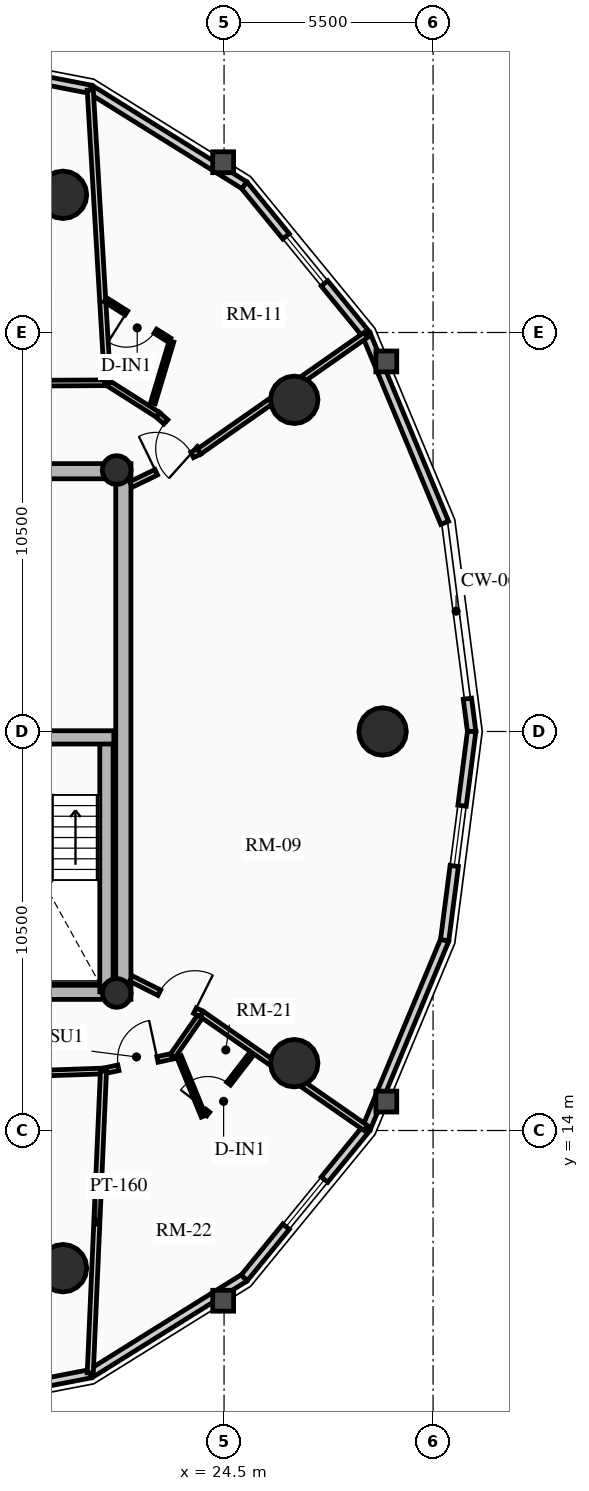
"""IFC4 building model, lengths in metres.
Left out: names, types, materials, properties, quantities, classifications, styles, units other than length and angle.
Written with IfcOpenShell. Run it as: python <this file> out.ifc"""

import sys

from ifc_helpers import new_model, si_unit, direction, frame, frame_2d, origin, origin_2d, place, context, subcontext, project, spatial, rectangle, circle, hollow_circle, extrude, source, transform, mapped, element, fill, save


model = new_model("IFC4")
c1 = context("Model", 3, precision=1e-05, world=origin(), true_north=direction((0.0, 1.0)))
c2 = subcontext(c1, "Body", "Model", "MODEL_VIEW")
j1 = project(units=[si_unit("LENGTHUNIT", "METRE"), si_unit("PLANEANGLEUNIT", "RADIAN")], contexts=[c1])
p1 = place(None, origin())
s1 = spatial("IfcSite", under=j1, at=p1, CompositionType="ELEMENT")
p2 = place(p1, origin())
s2 = spatial("IfcBuilding", under=s1, at=p2, CompositionType="ELEMENT")
p3 = place(p2, frame((0.0, 0.0, 157.42)))
s3 = spatial("IfcBuildingStorey", under=s2, at=p3, CompositionType="ELEMENT", Elevation=157.42)
p4 = place(p3, frame((21.85, 17.45, 0.0), z_axis=(0.0, 0.0, 1.0), x_axis=(0.0, 1.0, 0.0)))
e1 = element("IfcWall", 1, at=p4, inside=s3, PredefinedType="SHEAR", context=c2, shape_type="SweptSolid", body=[
    extrude(rectangle(XDim=14.1, YDim=0.4, at=frame_2d((7.05, 0.0))), origin(), (0.0, 0.0, 1.0), 2.91),
])
p5 = place(p3, frame((11.15, 17.65, 0.0), z_axis=(0.0, 0.0, 1.0), x_axis=(1.0, 0.0, 0.0)))
e2 = element("IfcWall", 2, at=p5, inside=s3, PredefinedType="SHEAR", context=c2, shape_type="SweptSolid", body=[
    extrude(rectangle(XDim=10.7, YDim=0.4, at=frame_2d((5.35, 0.0))), origin(), (0.0, 0.0, 1.0), 2.91),
])
m1 = source(origin(), c2, "Body", "SweptSolid", [
    extrude(rectangle(XDim=1.5, YDim=2.02, at=frame_2d((0.75, 1.01))), frame((0.0, 0.21, 0.0), z_axis=(0.0, -1.0, 0.0), x_axis=(1.0, 0.0, 0.0)), (0.0, 0.0, 1.0), 0.42),
])
p6 = place(p5, frame((5.45, 0.0, 0.0)))
e3 = element("IfcOpeningElement", 3, at=p6, cuts=e2, PredefinedType="OPENING", context=c2, shape_type="MappedRepresentation", body=[
    mapped(m1, transform((0.0, 0.0, 0.0), x_axis=(1.0, 0.0, 0.0), y_axis=(0.0, 1.0, 0.0), z_axis=(0.0, 0.0, 1.0), scale=1.0)),
])
p7 = place(p3, frame((11.15, 31.35, 0.0), z_axis=(0.0, 0.0, 1.0), x_axis=(1.0, 0.0, 0.0)))
e4 = element("IfcWall", 4, at=p7, inside=s3, PredefinedType="SHEAR", context=c2, shape_type="SweptSolid", body=[
    extrude(rectangle(XDim=10.7, YDim=0.4, at=frame_2d((5.35, 0.0))), origin(), (0.0, 0.0, 1.0), 2.91),
])
p8 = place(p7, frame((4.6, 0.0, 0.0)))
e5 = element("IfcOpeningElement", 5, at=p8, cuts=e4, PredefinedType="OPENING", context=c2, shape_type="MappedRepresentation", body=[
    mapped(m1, transform((0.0, 0.0, 0.0), x_axis=(1.0, 0.0, 0.0), y_axis=(0.0, 1.0, 0.0), z_axis=(0.0, 0.0, 1.0), scale=1.0)),
])
p9 = place(p3, frame((21.405, 17.65, 0.0), z_axis=(0.0, 0.0, 1.0), x_axis=(0.0, 1.0, 0.0)))
e6 = element("IfcWall", 6, at=p9, inside=s3, PredefinedType="SHEAR", context=c2, shape_type="SweptSolid", body=[
    extrude(rectangle(XDim=6.695, YDim=0.35, at=frame_2d((3.348, 0.0))), origin(), (0.0, 0.0, 1.0), 2.91),
])
p10 = place(p3, frame((18.315, 24.345, 0.0), z_axis=(0.0, 0.0, 1.0), x_axis=(1.0, 0.0, 0.0)))
e7 = element("IfcWall", 7, at=p10, inside=s3, PredefinedType="SHEAR", context=c2, shape_type="SweptSolid", body=[
    extrude(rectangle(XDim=3.285, YDim=0.35, at=frame_2d((1.643, 0.0))), origin(), (0.0, 0.0, 1.0), 2.91),
])
for number, where, z_axis, x_axis in (
    (8, (21.675, 17.62, 0.0), (0.0, 0.0, 1.0), (1.0, 0.0, 0.0)),
    (9, (21.675, 31.38, 0.0), (0.0, 0.0, 1.0), (1.0, 0.0, 0.0)),
):
    element("IfcColumn", number, at=place(p3, frame(where, z_axis=z_axis, x_axis=x_axis)), inside=s3, PredefinedType="COLUMN", context=c2, shape_type="SweptSolid", body=[
        extrude(hollow_circle(Radius=0.38, WallThickness=0.032, at=origin_2d()), origin(), (0.0, 0.0, 1.0), 2.91),
    ])
for number, where, z_axis, x_axis in (
    (10, (28.672, 24.5, 0.0), (0.0, 0.0, 1.0), (1.0, 0.0, 0.0)),
    (11, (26.347, 33.229, 0.0), (0.0, 0.0, 1.0), (1.0, 0.0, 0.0)),
    (12, (20.261, 38.623, 0.0), (0.0, 0.0, 1.0), (1.0, 0.0, 0.0)),
    (13, (20.261, 10.377, 0.0), (0.0, 0.0, 1.0), (1.0, 0.0, 0.0)),
    (14, (26.347, 15.771, 0.0), (0.0, 0.0, 1.0), (1.0, 0.0, 0.0)),
):
    element("IfcColumn", number, at=place(p3, frame(where, z_axis=z_axis, x_axis=x_axis)), inside=s3, PredefinedType="USERDEFINED", context=c2, shape_type="SweptSolid", body=[
        extrude(circle(Radius=0.625, at=origin_2d()), origin(), (0.0, 0.0, 1.0), 2.91),
    ])
p11 = place(p3, frame((30.903, 25.363, 0.0), z_axis=(0.0, 0.0, 1.0), x_axis=(0.128247365719, -0.991742211054, 0.0)))
e15 = element("IfcWall", 15, at=p11, inside=s3, PredefinedType="SOLIDWALL", context=c2, shape_type="SweptSolid", body=[
    extrude(rectangle(XDim=0.87, YDim=0.22, at=frame_2d((0.435, 0.0))), origin(), (0.0, 0.0, 1.0), 2.675),
])
p12 = place(p3, frame((28.243, 34.945, 0.0), z_axis=(0.0, 0.0, 1.0), x_axis=(0.384259959969, -0.923224936386, 0.0)))
e16 = element("IfcWall", 16, at=p12, inside=s3, PredefinedType="SOLIDWALL", context=c2, shape_type="SweptSolid", body=[
    extrude(rectangle(XDim=5.365, YDim=0.22, at=frame_2d((2.683, 0.0))), origin(), (0.0, 0.0, 1.0), 2.245),
])
p13 = place(p3, frame((25.032, 38.876, 0.0), z_axis=(0.0, 0.0, 1.0), x_axis=(0.632598524901, -0.774479894053, 0.0)))
e17 = element("IfcWall", 17, at=p13, inside=s3, PredefinedType="SOLIDWALL", context=c2, shape_type="SweptSolid", body=[
    extrude(rectangle(XDim=5.076, YDim=0.22, at=frame_2d((2.538, 0.0))), origin(), (0.0, 0.0, 1.0), 2.245),
])
m2 = source(origin(), c2, "Body", "SweptSolid", [
    extrude(rectangle(XDim=1.6, YDim=1.3, at=frame_2d((0.8, 0.65))), frame((0.0, 0.12, 0.0), z_axis=(0.0, -1.0, 0.0), x_axis=(1.0, 0.0, 0.0)), (0.0, 0.0, 1.0), 0.24),
])
p14 = place(p13, frame((1.738, 0.0, 0.65)))
e18 = element("IfcOpeningElement", 18, at=p14, cuts=e17, PredefinedType="OPENING", context=c2, shape_type="MappedRepresentation", body=[
    mapped(m2, transform((0.0, 0.0, 0.0), x_axis=(1.0, 0.0, 0.0), y_axis=(0.0, 1.0, 0.0), z_axis=(0.0, 0.0, 1.0), scale=1.0)),
])
p15 = place(p3, frame((20.985, 41.4, 0.0), z_axis=(0.0, 0.0, 1.0), x_axis=(0.848452391194, -0.529271707044, 0.0)))
e19 = element("IfcWall", 19, at=p15, inside=s3, PredefinedType="SOLIDWALL", context=c2, shape_type="SweptSolid", body=[
    extrude(rectangle(XDim=4.769, YDim=0.22, at=frame_2d((2.385, 0.0))), origin(), (0.0, 0.0, 1.0), 2.245),
])
p16 = place(p3, frame((16.5, 42.27, 0.0), z_axis=(0.0, 0.0, 1.0), x_axis=(0.981718699963, -0.190337579429, 0.0)))
e20 = element("IfcWall", 20, at=p16, inside=s3, PredefinedType="SOLIDWALL", context=c2, shape_type="SweptSolid", body=[
    extrude(rectangle(XDim=4.569, YDim=0.22, at=frame_2d((2.284, 0.0))), origin(), (0.0, 0.0, 1.0), 2.245),
])
p17 = place(p16, frame((1.484, 0.0, 0.65)))
e21 = element("IfcOpeningElement", 21, at=p17, cuts=e20, PredefinedType="OPENING", context=c2, shape_type="MappedRepresentation", body=[
    mapped(m2, transform((0.0, 0.0, 0.0), x_axis=(1.0, 0.0, 0.0), y_axis=(0.0, 1.0, 0.0), z_axis=(0.0, 0.0, 1.0), scale=1.0)),
])
p18 = place(p3, frame((20.985, 7.6, 0.0), z_axis=(0.0, 0.0, 1.0), x_axis=(-0.981718699963, -0.190337579429, 0.0)))
e22 = element("IfcWall", 22, at=p18, inside=s3, PredefinedType="SOLIDWALL", context=c2, shape_type="SweptSolid", body=[
    extrude(rectangle(XDim=4.569, YDim=0.22, at=frame_2d((2.284, 0.0))), origin(), (0.0, 0.0, 1.0), 2.245),
])
p19 = place(p18, frame((1.484, 0.0, 0.65)))
e23 = element("IfcOpeningElement", 23, at=p19, cuts=e22, PredefinedType="OPENING", context=c2, shape_type="MappedRepresentation", body=[
    mapped(m2, transform((0.0, 0.0, 0.0), x_axis=(1.0, 0.0, 0.0), y_axis=(0.0, 1.0, 0.0), z_axis=(0.0, 0.0, 1.0), scale=1.0)),
])
p20 = place(p3, frame((25.032, 10.124, 0.0), z_axis=(0.0, 0.0, 1.0), x_axis=(-0.848452391194, -0.529271707044, 0.0)))
e24 = element("IfcWall", 24, at=p20, inside=s3, PredefinedType="SOLIDWALL", context=c2, shape_type="SweptSolid", body=[
    extrude(rectangle(XDim=4.769, YDim=0.22, at=frame_2d((2.385, 0.0))), origin(), (0.0, 0.0, 1.0), 2.245),
])
p21 = place(p3, frame((28.243, 14.055, 0.0), z_axis=(0.0, 0.0, 1.0), x_axis=(-0.632598524901, -0.774479894053, 0.0)))
e25 = element("IfcWall", 25, at=p21, inside=s3, PredefinedType="SOLIDWALL", context=c2, shape_type="SweptSolid", body=[
    extrude(rectangle(XDim=5.076, YDim=0.22, at=frame_2d((2.538, 0.0))), origin(), (0.0, 0.0, 1.0), 2.245),
])
p22 = place(p21, frame((1.738, 0.0, 0.65)))
e26 = element("IfcOpeningElement", 26, at=p22, cuts=e25, PredefinedType="OPENING", context=c2, shape_type="MappedRepresentation", body=[
    mapped(m2, transform((0.0, 0.0, 0.0), x_axis=(1.0, 0.0, 0.0), y_axis=(0.0, 1.0, 0.0), z_axis=(0.0, 0.0, 1.0), scale=1.0)),
])
p23 = place(p3, frame((30.305, 19.009, 0.0), z_axis=(0.0, 0.0, 1.0), x_axis=(-0.384259959969, -0.923224936386, 0.0)))
e27 = element("IfcWall", 27, at=p23, inside=s3, PredefinedType="SOLIDWALL", context=c2, shape_type="SweptSolid", body=[
    extrude(rectangle(XDim=5.365, YDim=0.22, at=frame_2d((2.683, 0.0))), origin(), (0.0, 0.0, 1.0), 2.245),
])
p24 = place(p3, frame((31.015, 24.5, 0.0), z_axis=(0.0, 0.0, 1.0), x_axis=(-0.128266533912, -0.991739732126, 0.0)))
e28 = element("IfcWall", 28, at=p24, inside=s3, PredefinedType="SOLIDWALL", context=c2, shape_type="SweptSolid", body=[
    extrude(rectangle(XDim=5.537, YDim=0.22, at=frame_2d((2.769, 0.0))), origin(), (0.0, 0.0, 1.0), 2.245),
])
p25 = place(p24, frame((1.968, 0.0, 0.65)))
e29 = element("IfcOpeningElement", 29, at=p25, cuts=e28, PredefinedType="OPENING", context=c2, shape_type="MappedRepresentation", body=[
    mapped(m2, transform((0.0, 0.0, 0.0), x_axis=(1.0, 0.0, 0.0), y_axis=(0.0, 1.0, 0.0), z_axis=(0.0, 0.0, 1.0), scale=1.0)),
])
p26 = place(p3, frame((23.841, 31.866, 0.0), z_axis=(0.0, 0.0, 1.0), x_axis=(-0.74511843306, 0.666932171, 0.0)))
e30 = element("IfcWall", 30, at=p26, inside=s3, PredefinedType="PARTITIONING", context=c2, shape_type="SweptSolid", body=[
    extrude(rectangle(XDim=1.455, YDim=0.15, at=frame_2d((0.728, 0.0))), origin(), (0.0, 0.0, 1.0), 2.245),
])
m3 = source(origin(), c2, "Body", "SweptSolid", [
    extrude(rectangle(XDim=1.05, YDim=2.015, at=frame_2d((0.525, 1.007))), frame((0.0, 0.085, 0.0), z_axis=(0.0, -1.0, 0.0), x_axis=(1.0, 0.0, 0.0)), (0.0, 0.0, 1.0), 0.17),
])
p27 = place(p26, frame((0.12, 0.0, 0.0)))
e31 = element("IfcOpeningElement", 31, at=p27, cuts=e30, PredefinedType="OPENING", context=c2, shape_type="MappedRepresentation", body=[
    mapped(m3, transform((0.0, 0.0, 0.0), x_axis=(1.0, 0.0, 0.0), y_axis=(0.0, 1.0, 0.0), z_axis=(0.0, 0.0, 1.0), scale=1.0)),
])
p28 = place(p3, frame((22.756, 32.836, 0.0), z_axis=(0.0, 0.0, 1.0), x_axis=(-0.843828401801, 0.536613108593, 0.0)))
e32 = element("IfcWall", 32, at=p28, inside=s3, PredefinedType="PARTITIONING", context=c2, shape_type="SweptSolid", body=[
    extrude(rectangle(XDim=1.565, YDim=0.15, at=frame_2d((0.783, 0.0))), origin(), (0.0, 0.0, 1.0), 2.245),
])
p29 = place(p3, frame((21.435, 33.677, 0.0), z_axis=(0.0, 0.0, 1.0), x_axis=(-0.999986775557, -0.005142831114, 0.0)))
e33 = element("IfcWall", 33, at=p29, inside=s3, PredefinedType="PARTITIONING", context=c2, shape_type="SweptSolid", body=[
    extrude(rectangle(XDim=3.323, YDim=0.15, at=frame_2d((1.662, 0.0))), origin(), (0.0, 0.0, 1.0), 2.245),
])
p30 = place(p29, frame((1.645, 0.0, 0.0)))
e34 = element("IfcOpeningElement", 34, at=p30, cuts=e33, PredefinedType="OPENING", context=c2, shape_type="MappedRepresentation", body=[
    mapped(m3, transform((0.0, 0.0, 0.0), x_axis=(1.0, 0.0, 0.0), y_axis=(0.0, 1.0, 0.0), z_axis=(0.0, 0.0, 1.0), scale=1.0)),
])
p31 = place(p3, frame((14.813, 15.341, 0.0), z_axis=(0.0, 0.0, 1.0), x_axis=(0.999402077819, 0.034575813105, 0.0)))
e35 = element("IfcWall", 35, at=p31, inside=s3, PredefinedType="PARTITIONING", context=c2, shape_type="SweptSolid", body=[
    extrude(rectangle(XDim=6.517, YDim=0.15, at=frame_2d((3.259, 0.0))), origin(), (0.0, 0.0, 1.0), 2.245),
])
p32 = place(p31, frame((2.734, 0.0, 0.0)))
e36 = element("IfcOpeningElement", 36, at=p32, cuts=e35, PredefinedType="OPENING", context=c2, shape_type="MappedRepresentation", body=[
    mapped(m3, transform((0.0, 0.0, 0.0), x_axis=(1.0, 0.0, 0.0), y_axis=(0.0, 1.0, 0.0), z_axis=(0.0, 0.0, 1.0), scale=1.0)),
])
p33 = place(p3, frame((21.326, 15.566, 0.0), z_axis=(0.0, 0.0, 1.0), x_axis=(0.977908238308, 0.209034632176, 0.0)))
e37 = element("IfcWall", 37, at=p33, inside=s3, PredefinedType="PARTITIONING", context=c2, shape_type="SweptSolid", body=[
    extrude(rectangle(XDim=1.855, YDim=0.15, at=frame_2d((0.927, 0.0))), origin(), (0.0, 0.0, 1.0), 2.245),
])
p34 = place(p33, frame((0.402, 0.0, 0.0)))
e38 = element("IfcOpeningElement", 38, at=p34, cuts=e37, PredefinedType="OPENING", context=c2, shape_type="MappedRepresentation", body=[
    mapped(m3, transform((0.0, 0.0, 0.0), x_axis=(1.0, 0.0, 0.0), y_axis=(0.0, 1.0, 0.0), z_axis=(0.0, 0.0, 1.0), scale=1.0)),
])
p35 = place(p3, frame((23.14, 15.954, 0.0), z_axis=(0.0, 0.0, 1.0), x_axis=(0.570699895117, 0.821158711647, 0.0)))
e39 = element("IfcWall", 39, at=p35, inside=s3, PredefinedType="PARTITIONING", context=c2, shape_type="SweptSolid", body=[
    extrude(rectangle(XDim=1.354, YDim=0.15, at=frame_2d((0.677, 0.0))), origin(), (0.0, 0.0, 1.0), 2.245),
])
p36 = place(p3, frame((23.841, 31.866, 0.0), z_axis=(0.0, 0.0, 1.0), x_axis=(0.819514693563, 0.573058170724, 0.0)))
e40 = element("IfcWall", 40, at=p36, inside=s3, PredefinedType="PARTITIONING", context=c2, shape_type="SweptSolid", body=[
    extrude(rectangle(XDim=5.352, YDim=0.16, at=frame_2d((2.676, 0.0))), origin(), (0.0, 0.0, 1.0), 2.245),
])
p37 = place(p3, frame((21.435, 33.677, 0.0), z_axis=(0.0, 0.0, 1.0), x_axis=(-0.059087305226, 0.99825281886, 0.0)))
e41 = element("IfcWall", 41, at=p37, inside=s3, PredefinedType="PARTITIONING", context=c2, shape_type="SweptSolid", body=[
    extrude(rectangle(XDim=7.718, YDim=0.16, at=frame_2d((3.859, 0.0))), origin(), (0.0, 0.0, 1.0), 2.245),
])
p38 = place(p3, frame((21.326, 15.566, 0.0), z_axis=(0.0, 0.0, 1.0), x_axis=(-0.043642330618, -0.999047219594, 0.0)))
e42 = element("IfcWall", 42, at=p38, inside=s3, PredefinedType="PARTITIONING", context=c2, shape_type="SweptSolid", body=[
    extrude(rectangle(XDim=7.955, YDim=0.16, at=frame_2d((3.978, 0.0))), origin(), (0.0, 0.0, 1.0), 2.245),
])
p39 = place(p3, frame((23.913, 17.065, 0.0), z_axis=(0.0, 0.0, 1.0), x_axis=(0.821126775727, -0.570745843773, 0.0)))
e43 = element("IfcWall", 43, at=p39, inside=s3, PredefinedType="PARTITIONING", context=c2, shape_type="SweptSolid", body=[
    extrude(rectangle(XDim=5.254, YDim=0.16, at=frame_2d((2.627, 0.0))), origin(), (0.0, 0.0, 1.0), 2.245),
])
p40 = place(p3, frame((22.05, 31.0, 0.0), z_axis=(0.0, 0.0, 1.0), x_axis=(0.900241516545, 0.435390872537, 0.0)))
e44 = element("IfcWall", 44, at=p40, inside=s3, PredefinedType="PARTITIONING", context=c2, shape_type="SweptSolid", body=[
    extrude(rectangle(XDim=1.989, YDim=0.16, at=frame_2d((0.995, 0.0))), origin(), (0.0, 0.0, 1.0), 2.245),
])
m4 = source(origin(), c2, "Body", "SweptSolid", [
    extrude(rectangle(XDim=1.05, YDim=2.015, at=frame_2d((0.525, 1.007))), frame((0.0, 0.09, 0.0), z_axis=(0.0, -1.0, 0.0), x_axis=(1.0, 0.0, 0.0)), (0.0, 0.0, 1.0), 0.18),
])
p41 = place(p40, frame((0.739, 0.0, 0.0)))
e45 = element("IfcOpeningElement", 45, at=p41, cuts=e44, PredefinedType="OPENING", context=c2, shape_type="MappedRepresentation", body=[
    mapped(m4, transform((0.0, 0.0, 0.0), x_axis=(1.0, 0.0, 0.0), y_axis=(0.0, 1.0, 0.0), z_axis=(0.0, 0.0, 1.0), scale=1.0)),
])
p42 = place(p3, frame((22.05, 18.0, 0.0), z_axis=(0.0, 0.0, 1.0), x_axis=(0.893817206679, -0.448431489799, 0.0)))
e46 = element("IfcWall", 46, at=p42, inside=s3, PredefinedType="PARTITIONING", context=c2, shape_type="SweptSolid", body=[
    extrude(rectangle(XDim=2.084, YDim=0.16, at=frame_2d((1.042, 0.0))), origin(), (0.0, 0.0, 1.0), 2.245),
])
p43 = place(p42, frame((0.834, 0.0, 0.0)))
e47 = element("IfcOpeningElement", 47, at=p43, cuts=e46, PredefinedType="OPENING", context=c2, shape_type="MappedRepresentation", body=[
    mapped(m4, transform((0.0, 0.0, 0.0), x_axis=(1.0, 0.0, 0.0), y_axis=(0.0, 1.0, 0.0), z_axis=(0.0, 0.0, 1.0), scale=1.0)),
])
p44 = place(p3, frame((22.628, 33.142, 0.0), z_axis=(0.0, 0.0, 1.0), x_axis=(0.28808673097, 0.957604320917, 0.0)))
e48 = element("IfcWall", 48, at=p44, inside=s3, PredefinedType="PARTITIONING", context=c2, shape_type="SweptSolid", body=[
    extrude(rectangle(XDim=1.698, YDim=0.125, at=frame_2d((0.849, 0.0))), origin(), (0.0, 0.0, 1.0), 2.245),
])
p45 = place(p3, frame((23.064, 34.801, 0.0), z_axis=(0.0, 0.0, 1.0), x_axis=(-0.846418905871, 0.532517638942, 0.0)))
e49 = element("IfcWall", 49, at=p45, inside=s3, PredefinedType="PARTITIONING", context=c2, shape_type="SweptSolid", body=[
    extrude(rectangle(XDim=1.993, YDim=0.125, at=frame_2d((0.997, 0.0))), origin(), (0.0, 0.0, 1.0), 2.675),
])
m5 = source(origin(), c2, "Body", "SweptSolid", [
    extrude(rectangle(XDim=0.9, YDim=2.005, at=frame_2d((0.45, 1.002))), frame((0.0, 0.073, 0.0), z_axis=(0.0, -1.0, 0.0), x_axis=(1.0, 0.0, 0.0)), (0.0, 0.0, 1.0), 0.145),
])
p46 = place(p45, frame((0.44, 0.0, 0.0)))
e50 = element("IfcOpeningElement", 50, at=p46, cuts=e49, PredefinedType="OPENING", context=c2, shape_type="MappedRepresentation", body=[
    mapped(m5, transform((0.0, 0.0, 0.0), x_axis=(1.0, 0.0, 0.0), y_axis=(0.0, 1.0, 0.0), z_axis=(0.0, 0.0, 1.0), scale=1.0)),
])
p47 = place(p3, frame((23.315, 15.947, 0.0), z_axis=(0.0, 0.0, 1.0), x_axis=(0.37920929394, -0.925310926873, 0.0)))
e51 = element("IfcWall", 51, at=p47, inside=s3, PredefinedType="PARTITIONING", context=c2, shape_type="SweptSolid", body=[
    extrude(rectangle(XDim=1.698, YDim=0.125, at=frame_2d((0.849, 0.0))), origin(), (0.0, 0.0, 1.0), 2.675),
])
p48 = place(p3, frame((23.998, 14.425, 0.0), z_axis=(0.0, 0.0, 1.0), x_axis=(0.610534539262, 0.791989631478, 0.0)))
e52 = element("IfcWall", 52, at=p48, inside=s3, PredefinedType="PARTITIONING", context=c2, shape_type="SweptSolid", body=[
    extrude(rectangle(XDim=2.033, YDim=0.125, at=frame_2d((1.017, 0.0))), origin(), (0.0, 0.0, 1.0), 2.675),
])
p49 = place(p48, frame((0.12, 0.0, 0.0)))
e53 = element("IfcOpeningElement", 53, at=p49, cuts=e52, PredefinedType="OPENING", context=c2, shape_type="MappedRepresentation", body=[
    mapped(m5, transform((0.0, 0.0, 0.0), x_axis=(1.0, 0.0, 0.0), y_axis=(0.0, 1.0, 0.0), z_axis=(0.0, 0.0, 1.0), scale=1.0)),
])
m6 = source(origin(), c2, "Body", "SweptSolid", [
    extrude(rectangle(XDim=1.6, YDim=1.3, at=frame_2d((0.8, 0.65))), frame((0.0, 0.03, 0.0), z_axis=(0.0, -1.0, 0.0), x_axis=(1.0, 0.0, 0.0)), (0.0, 0.0, 1.0), 0.06),
])
p50 = place(p14, origin())
e54 = element("IfcWindow", 54, at=p50, inside=s3, PartitioningType="SINGLE_PANEL", PredefinedType="WINDOW", context=c2, shape_type="MappedRepresentation", body=[
    mapped(m6, transform((0.0, 0.0, 0.0), x_axis=(1.0, 0.0, 0.0), y_axis=(0.0, 1.0, 0.0), z_axis=(0.0, 0.0, 1.0), scale=1.0)),
])
fill(e18, e54)
p51 = place(p22, origin())
e55 = element("IfcWindow", 55, at=p51, inside=s3, PartitioningType="SINGLE_PANEL", PredefinedType="WINDOW", context=c2, shape_type="MappedRepresentation", body=[
    mapped(m6, transform((0.0, 0.0, 0.0), x_axis=(1.0, 0.0, 0.0), y_axis=(0.0, 1.0, 0.0), z_axis=(0.0, 0.0, 1.0), scale=1.0)),
])
fill(e26, e55)
p52 = place(p25, origin())
e56 = element("IfcWindow", 56, at=p52, inside=s3, PartitioningType="SINGLE_PANEL", PredefinedType="WINDOW", context=c2, shape_type="MappedRepresentation", body=[
    mapped(m6, transform((0.0, 0.0, 0.0), x_axis=(1.0, 0.0, 0.0), y_axis=(0.0, 1.0, 0.0), z_axis=(0.0, 0.0, 1.0), scale=1.0)),
])
fill(e29, e56)
m7 = source(origin(), c2, "Body", "SweptSolid", [
    extrude(rectangle(XDim=1.05, YDim=2.015, at=frame_2d((0.525, 1.007))), frame((0.0, 0.025, 0.0), z_axis=(0.0, -1.0, 0.0), x_axis=(1.0, 0.0, 0.0)), (0.0, 0.0, 1.0), 0.05),
])
p53 = place(p41, origin())
e57 = element("IfcDoor", 57, at=p53, inside=s3, OperationType="SINGLE_SWING_LEFT", PredefinedType="DOOR", context=c2, shape_type="MappedRepresentation", body=[
    mapped(m7, transform((0.0, 0.0, 0.0), x_axis=(1.0, 0.0, 0.0), y_axis=(0.0, 1.0, 0.0), z_axis=(0.0, 0.0, 1.0), scale=1.0)),
])
fill(e45, e57)
p54 = place(p43, origin())
e58 = element("IfcDoor", 58, at=p54, inside=s3, OperationType="SINGLE_SWING_RIGHT", PredefinedType="DOOR", context=c2, shape_type="MappedRepresentation", body=[
    mapped(m7, transform((0.0, 0.0, 0.0), x_axis=(1.0, 0.0, 0.0), y_axis=(0.0, 1.0, 0.0), z_axis=(0.0, 0.0, 1.0), scale=1.0)),
])
fill(e47, e58)
p55 = place(p27, origin())
e59 = element("IfcDoor", 59, at=p55, inside=s3, OperationType="SINGLE_SWING_LEFT", PredefinedType="DOOR", context=c2, shape_type="MappedRepresentation", body=[
    mapped(m7, transform((0.0, 0.0, 0.0), x_axis=(1.0, 0.0, 0.0), y_axis=(0.0, 1.0, 0.0), z_axis=(0.0, 0.0, 1.0), scale=1.0)),
])
fill(e31, e59)
m8 = source(origin(), c2, "Body", "SweptSolid", [
    extrude(rectangle(XDim=0.9, YDim=2.005, at=frame_2d((0.45, 1.002))), frame((0.0, 0.025, 0.0), z_axis=(0.0, -1.0, 0.0), x_axis=(1.0, 0.0, 0.0)), (0.0, 0.0, 1.0), 0.05),
])
p56 = place(p46, origin())
e60 = element("IfcDoor", 60, at=p56, inside=s3, OperationType="SINGLE_SWING_RIGHT", PredefinedType="DOOR", context=c2, shape_type="MappedRepresentation", body=[
    mapped(m8, transform((0.0, 0.0, 0.0), x_axis=(1.0, 0.0, 0.0), y_axis=(0.0, 1.0, 0.0), z_axis=(0.0, 0.0, 1.0), scale=1.0)),
])
fill(e50, e60)
p57 = place(p34, origin())
e61 = element("IfcDoor", 61, at=p57, inside=s3, OperationType="SINGLE_SWING_RIGHT", PredefinedType="DOOR", context=c2, shape_type="MappedRepresentation", body=[
    mapped(m7, transform((0.0, 0.0, 0.0), x_axis=(1.0, 0.0, 0.0), y_axis=(0.0, 1.0, 0.0), z_axis=(0.0, 0.0, 1.0), scale=1.0)),
])
fill(e38, e61)
p58 = place(p49, origin())
e62 = element("IfcDoor", 62, at=p58, inside=s3, OperationType="SINGLE_SWING_LEFT", PredefinedType="DOOR", context=c2, shape_type="MappedRepresentation", body=[
    mapped(m8, transform((0.0, 0.0, 0.0), x_axis=(1.0, 0.0, 0.0), y_axis=(0.0, 1.0, 0.0), z_axis=(0.0, 0.0, 1.0), scale=1.0)),
])
fill(e53, e62)
save(model, sys.argv[1])
